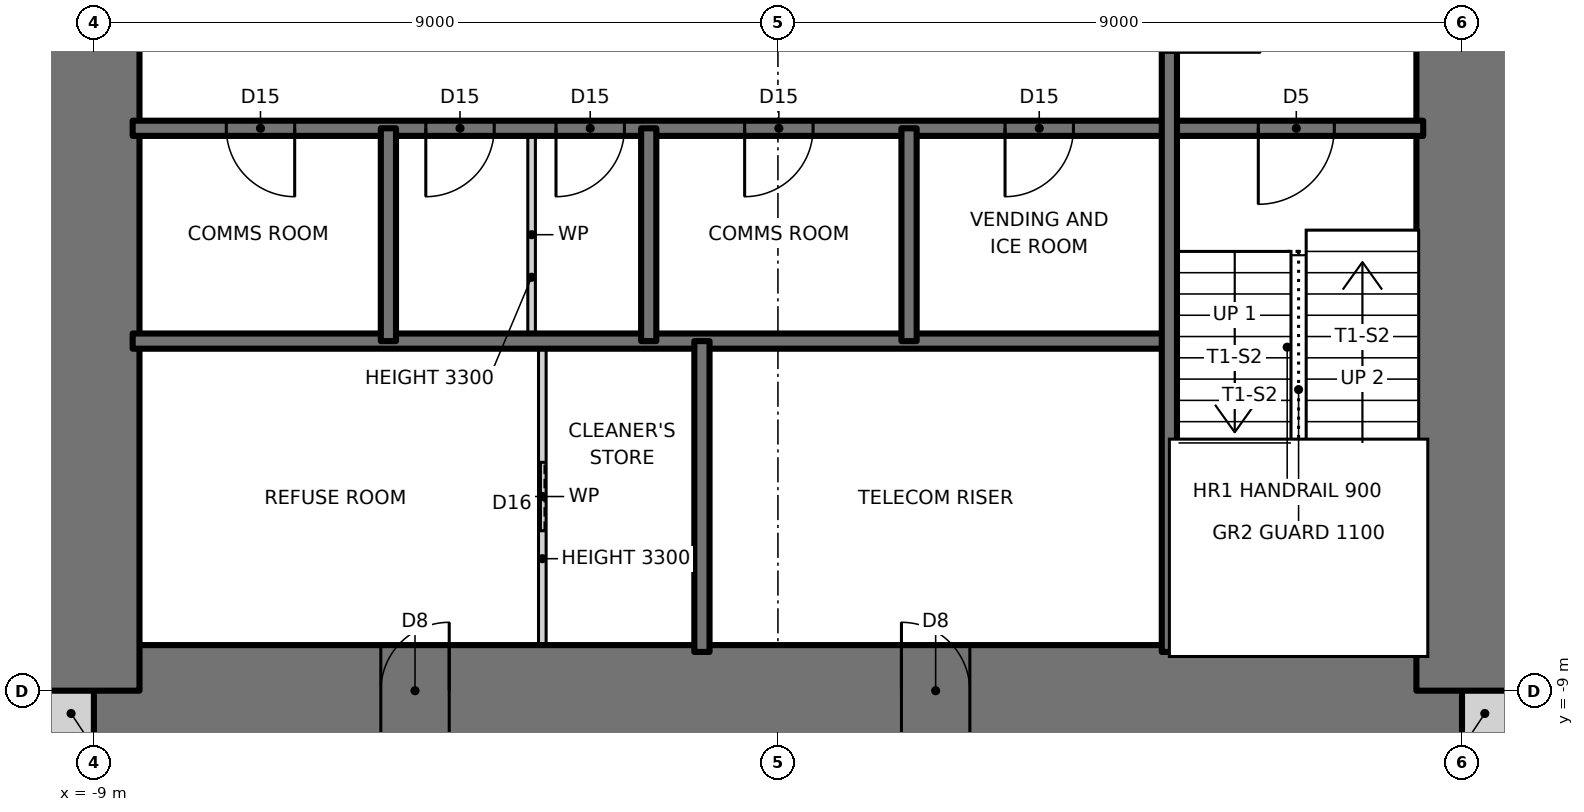
"""IFC4 building model, lengths in metres.
Left out: names, types, materials, properties, quantities, classifications, styles, units other than length and angle.
Written with IfcOpenShell. Run it as: python <this file> out.ifc"""

import sys

from ifc_helpers import new_model, si_unit, direction, frame, frame_2d, origin, place, context, subcontext, project, spatial, rectangle, extrude, element, fill, save


model = new_model("IFC4")
c1 = context("Model", 3, precision=1e-05, world=origin(), true_north=direction((0.0, 1.0)))
c2 = subcontext(c1, "Body", "Model", "MODEL_VIEW")
j1 = project(units=[si_unit("LENGTHUNIT", "METRE"), si_unit("PLANEANGLEUNIT", "RADIAN")], contexts=[c1])
p1 = place(None, origin())
s1 = spatial("IfcSite", under=j1, at=p1, CompositionType="ELEMENT")
p2 = place(p1, origin())
s2 = spatial("IfcBuilding", under=s1, at=p2, CompositionType="ELEMENT")
p3 = place(p2, frame((0.0, 0.0, 163.5)))
s3 = spatial("IfcBuildingStorey", under=s2, at=p3, CompositionType="ELEMENT", Elevation=163.5)
for number, where, z_axis, x_axis in (
    (1, (-9.6, -9.3, 0.0), (0.0, 0.0, 1.0), (1.0, 0.0, 0.0)),
    (2, (9.0, -9.3, 0.0), (0.0, 0.0, 1.0), (1.0, 0.0, 0.0)),
):
    element("IfcWall", number, at=place(p3, frame(where, z_axis=z_axis, x_axis=x_axis)), inside=s3, PredefinedType="SOLIDWALL", context=c2, shape_type="SweptSolid", body=[
        extrude(rectangle(XDim=0.6, YDim=0.6, at=frame_2d((0.3, 0.0))), origin(), (0.0, 0.0, 1.0), 3.5),
    ])
p4 = place(p3, frame((-9.0, -9.0, 0.0), z_axis=(0.0, 0.0, 1.0), x_axis=(1.0, 0.0, 0.0)))
e3 = element("IfcWall", 3, at=p4, inside=s3, PredefinedType="SHEAR", context=c2, shape_type="SweptSolid", body=[
    extrude(rectangle(XDim=18.0, YDim=1.2, at=frame_2d((9.0, 0.0))), origin(), (0.0, 0.0, 1.0), 3.5),
])
p5 = place(p4, frame((3.775, 0.0, 0.0)))
e4 = element("IfcOpeningElement", 4, at=p5, cuts=e3, PredefinedType="OPENING", context=c2, shape_type="SweptSolid", body=[
    extrude(rectangle(XDim=0.9, YDim=2.1, at=frame_2d((0.45, 1.05))), frame((0.0, 0.61, 0.0), z_axis=(0.0, -1.0, 0.0), x_axis=(1.0, 0.0, 0.0)), (0.0, 0.0, 1.0), 1.22),
])
p6 = place(p4, frame((10.625, 0.0, 0.0)))
e5 = element("IfcOpeningElement", 5, at=p6, cuts=e3, PredefinedType="OPENING", context=c2, shape_type="SweptSolid", body=[
    extrude(rectangle(XDim=0.9, YDim=2.1, at=frame_2d((0.45, 1.05))), frame((0.0, 0.61, 0.0), z_axis=(0.0, -1.0, 0.0), x_axis=(1.0, 0.0, 0.0)), (0.0, 0.0, 1.0), 1.22),
])
p7 = place(p3, frame((9.0, -9.0, 0.0), z_axis=(0.0, 0.0, 1.0), x_axis=(0.0, 1.0, 0.0)))
e6 = element("IfcWall", 6, at=p7, inside=s3, PredefinedType="SHEAR", context=c2, shape_type="SweptSolid", body=[
    extrude(rectangle(XDim=18.0, YDim=1.2, at=frame_2d((9.0, 0.0))), origin(), (0.0, 0.0, 1.0), 3.5),
])
p8 = place(p7, frame((8.5, 0.0, 0.0)))
e7 = element("IfcOpeningElement", 7, at=p8, cuts=e6, PredefinedType="OPENING", context=c2, shape_type="SweptSolid", body=[
    extrude(rectangle(XDim=1.0, YDim=2.1, at=frame_2d((0.5, 1.05))), frame((0.0, 0.61, 0.0), z_axis=(0.0, -1.0, 0.0), x_axis=(1.0, 0.0, 0.0)), (0.0, 0.0, 1.0), 1.22),
])
p9 = place(p3, frame((-9.0, 9.0, 0.0), z_axis=(0.0, 0.0, 1.0), x_axis=(0.0, -1.0, 0.0)))
e8 = element("IfcWall", 8, at=p9, inside=s3, PredefinedType="SHEAR", context=c2, shape_type="SweptSolid", body=[
    extrude(rectangle(XDim=18.0, YDim=1.2, at=frame_2d((9.0, 0.0))), origin(), (0.0, 0.0, 1.0), 3.5),
])
p10 = place(p9, frame((8.5, 0.0, 0.0)))
e9 = element("IfcOpeningElement", 9, at=p10, cuts=e8, PredefinedType="OPENING", context=c2, shape_type="SweptSolid", body=[
    extrude(rectangle(XDim=1.0, YDim=2.1, at=frame_2d((0.5, 1.05))), frame((0.0, 0.61, 0.0), z_axis=(0.0, -1.0, 0.0), x_axis=(1.0, 0.0, 0.0)), (0.0, 0.0, 1.0), 1.22),
])
p11 = place(p3, frame((-8.49, -4.4, 0.0), z_axis=(0.0, 0.0, 1.0), x_axis=(1.0, 0.0, 0.0)))
e10 = element("IfcWall", 10, at=p11, inside=s3, PredefinedType="SOLIDWALL", context=c2, shape_type="SweptSolid", body=[
    extrude(rectangle(XDim=13.64, YDim=0.2, at=frame_2d((6.82, 0.0))), origin(), (0.0, 0.0, 1.0), 3.5),
])
p12 = place(p3, frame((-8.49, -1.6, 0.0), z_axis=(0.0, 0.0, 1.0), x_axis=(1.0, 0.0, 0.0)))
e11 = element("IfcWall", 11, at=p12, inside=s3, PredefinedType="SOLIDWALL", context=c2, shape_type="SweptSolid", body=[
    extrude(rectangle(XDim=16.98, YDim=0.2, at=frame_2d((8.49, 0.0))), origin(), (0.0, 0.0, 1.0), 3.5),
])
p13 = place(p12, frame((14.81, 0.0, 0.0)))
e12 = element("IfcOpeningElement", 12, at=p13, cuts=e11, PredefinedType="OPENING", context=c2, shape_type="SweptSolid", body=[
    extrude(rectangle(XDim=1.0, YDim=2.1, at=frame_2d((0.5, 1.05))), frame((0.0, 0.11, 0.0), z_axis=(0.0, -1.0, 0.0), x_axis=(1.0, 0.0, 0.0)), (0.0, 0.0, 1.0), 0.22),
])
p14 = place(p12, frame((1.232, 0.0, 0.0)))
e13 = element("IfcOpeningElement", 13, at=p14, cuts=e11, PredefinedType="OPENING", context=c2, shape_type="SweptSolid", body=[
    extrude(rectangle(XDim=0.9, YDim=2.1, at=frame_2d((0.45, 1.05))), frame((0.0, 0.11, 0.0), z_axis=(0.0, -1.0, 0.0), x_axis=(1.0, 0.0, 0.0)), (0.0, 0.0, 1.0), 0.22),
])
p15 = place(p12, frame((5.57, 0.0, 0.0)))
e14 = element("IfcOpeningElement", 14, at=p15, cuts=e11, PredefinedType="OPENING", context=c2, shape_type="SweptSolid", body=[
    extrude(rectangle(XDim=0.9, YDim=2.1, at=frame_2d((0.45, 1.05))), frame((0.0, 0.11, 0.0), z_axis=(0.0, -1.0, 0.0), x_axis=(1.0, 0.0, 0.0)), (0.0, 0.0, 1.0), 0.22),
])
p16 = place(p12, frame((3.857, 0.0, 0.0)))
e15 = element("IfcOpeningElement", 15, at=p16, cuts=e11, PredefinedType="OPENING", context=c2, shape_type="SweptSolid", body=[
    extrude(rectangle(XDim=0.9, YDim=2.1, at=frame_2d((0.45, 1.05))), frame((0.0, 0.11, 0.0), z_axis=(0.0, -1.0, 0.0), x_axis=(1.0, 0.0, 0.0)), (0.0, 0.0, 1.0), 0.22),
])
p17 = place(p12, frame((8.052, 0.0, 0.0)))
e16 = element("IfcOpeningElement", 16, at=p17, cuts=e11, PredefinedType="OPENING", context=c2, shape_type="SweptSolid", body=[
    extrude(rectangle(XDim=0.9, YDim=2.1, at=frame_2d((0.45, 1.05))), frame((0.0, 0.11, 0.0), z_axis=(0.0, -1.0, 0.0), x_axis=(1.0, 0.0, 0.0)), (0.0, 0.0, 1.0), 0.22),
])
p18 = place(p12, frame((11.478, 0.0, 0.0)))
e17 = element("IfcOpeningElement", 17, at=p18, cuts=e11, PredefinedType="OPENING", context=c2, shape_type="SweptSolid", body=[
    extrude(rectangle(XDim=0.9, YDim=2.1, at=frame_2d((0.45, 1.05))), frame((0.0, 0.11, 0.0), z_axis=(0.0, -1.0, 0.0), x_axis=(1.0, 0.0, 0.0)), (0.0, 0.0, 1.0), 0.22),
])
p19 = place(p3, frame((5.15, -8.49, 0.0), z_axis=(0.0, 0.0, 1.0), x_axis=(0.0, 1.0, 0.0)))
e18 = element("IfcWall", 18, at=p19, inside=s3, PredefinedType="SOLIDWALL", context=c2, shape_type="SweptSolid", body=[
    extrude(rectangle(XDim=13.09, YDim=0.2, at=frame_2d((6.545, 0.0))), origin(), (0.0, 0.0, 1.0), 3.5),
])
p20 = place(p19, frame((7.89, 0.0, 0.0)))
e19 = element("IfcOpeningElement", 19, at=p20, cuts=e18, PredefinedType="OPENING", context=c2, shape_type="SweptSolid", body=[
    extrude(rectangle(XDim=1.2, YDim=2.1, at=frame_2d((0.6, 1.05))), frame((0.0, 0.11, 0.0), z_axis=(0.0, -1.0, 0.0), x_axis=(1.0, 0.0, 0.0)), (0.0, 0.0, 1.0), 0.22),
])
p21 = place(p3, frame((1.725, -4.4, 0.0), z_axis=(0.0, 0.0, 1.0), x_axis=(0.0, 1.0, 0.0)))
e20 = element("IfcWall", 20, at=p21, inside=s3, PredefinedType="SOLIDWALL", context=c2, shape_type="SweptSolid", body=[
    extrude(rectangle(XDim=2.8, YDim=0.2, at=frame_2d((1.4, 0.0))), origin(), (0.0, 0.0, 1.0), 3.5),
])
p22 = place(p3, frame((-1.0, -8.49, 0.0), z_axis=(0.0, 0.0, 1.0), x_axis=(0.0, 1.0, 0.0)))
e21 = element("IfcWall", 21, at=p22, inside=s3, PredefinedType="SOLIDWALL", context=c2, shape_type="SweptSolid", body=[
    extrude(rectangle(XDim=4.09, YDim=0.2, at=frame_2d((2.045, 0.0))), origin(), (0.0, 0.0, 1.0), 3.5),
])
p23 = place(p3, frame((-1.7, -4.4, 0.0), z_axis=(0.0, 0.0, 1.0), x_axis=(0.0, 1.0, 0.0)))
e22 = element("IfcWall", 22, at=p23, inside=s3, PredefinedType="SOLIDWALL", context=c2, shape_type="SweptSolid", body=[
    extrude(rectangle(XDim=2.8, YDim=0.2, at=frame_2d((1.4, 0.0))), origin(), (0.0, 0.0, 1.0), 3.5),
])
p24 = place(p3, frame((-3.1, -8.49, 0.0), z_axis=(0.0, 0.0, 1.0), x_axis=(0.0, 1.0, 0.0)))
e23 = element("IfcWall", 23, at=p24, inside=s3, PredefinedType="PARTITIONING", context=c2, shape_type="SweptSolid", body=[
    extrude(rectangle(XDim=4.09, YDim=0.1, at=frame_2d((2.045, 0.0))), origin(), (0.0, 0.0, 1.0), 3.3),
])
p25 = place(p24, frame((1.595, 0.0, 0.0)))
e24 = element("IfcOpeningElement", 24, at=p25, cuts=e23, PredefinedType="OPENING", context=c2, shape_type="SweptSolid", body=[
    extrude(rectangle(XDim=0.9, YDim=2.1, at=frame_2d((0.45, 1.05))), frame((0.0, 0.06, 0.0), z_axis=(0.0, -1.0, 0.0), x_axis=(1.0, 0.0, 0.0)), (0.0, 0.0, 1.0), 0.12),
])
p26 = place(p3, frame((-3.241, -4.4, 0.0), z_axis=(0.0, 0.0, 1.0), x_axis=(0.0, 1.0, 0.0)))
e25 = element("IfcWall", 25, at=p26, inside=s3, PredefinedType="PARTITIONING", context=c2, shape_type="SweptSolid", body=[
    extrude(rectangle(XDim=2.8, YDim=0.1, at=frame_2d((1.4, 0.0))), origin(), (0.0, 0.0, 1.0), 3.3),
])
p27 = place(p3, frame((-5.125, -4.4, 0.0), z_axis=(0.0, 0.0, 1.0), x_axis=(0.0, 1.0, 0.0)))
e26 = element("IfcWall", 26, at=p27, inside=s3, PredefinedType="SOLIDWALL", context=c2, shape_type="SweptSolid", body=[
    extrude(rectangle(XDim=2.8, YDim=0.2, at=frame_2d((1.4, 0.0))), origin(), (0.0, 0.0, 1.0), 3.5),
])
p28 = place(p13, frame((1.0, 0.0, 0.0), z_axis=(0.0, 0.0, 1.0), x_axis=(-1.0, 0.0, 0.0)))
e27 = element("IfcDoor", 27, at=p28, inside=s3, OperationType="SINGLE_SWING_RIGHT", PredefinedType="DOOR", context=c2, shape_type="SweptSolid", body=[
    extrude(rectangle(XDim=1.0, YDim=2.1, at=frame_2d((0.5, 1.05))), frame((0.0, 0.025, 0.0), z_axis=(0.0, -1.0, 0.0), x_axis=(1.0, 0.0, 0.0)), (0.0, 0.0, 1.0), 0.05),
])
fill(e12, e27)
p29 = place(p20, frame((1.2, 0.0, 0.0), z_axis=(0.0, 0.0, 1.0), x_axis=(-1.0, 0.0, 0.0)))
e28 = element("IfcDoor", 28, at=p29, inside=s3, OperationType="SINGLE_SWING_RIGHT", PredefinedType="DOOR", context=c2, shape_type="SweptSolid", body=[
    extrude(rectangle(XDim=1.2, YDim=2.1, at=frame_2d((0.6, 1.05))), frame((0.0, 0.025, 0.0), z_axis=(0.0, -1.0, 0.0), x_axis=(1.0, 0.0, 0.0)), (0.0, 0.0, 1.0), 0.05),
])
fill(e19, e28)
p30 = place(p14, frame((0.9, 0.0, 0.0), z_axis=(0.0, 0.0, 1.0), x_axis=(-1.0, 0.0, 0.0)))
e29 = element("IfcDoor", 29, at=p30, inside=s3, OperationType="SINGLE_SWING_LEFT", PredefinedType="DOOR", context=c2, shape_type="SweptSolid", body=[
    extrude(rectangle(XDim=0.9, YDim=2.1, at=frame_2d((0.45, 1.05))), frame((0.0, 0.025, 0.0), z_axis=(0.0, -1.0, 0.0), x_axis=(1.0, 0.0, 0.0)), (0.0, 0.0, 1.0), 0.05),
])
fill(e13, e29)
p31 = place(p15, frame((0.9, 0.0, 0.0), z_axis=(0.0, 0.0, 1.0), x_axis=(-1.0, 0.0, 0.0)))
e30 = element("IfcDoor", 30, at=p31, inside=s3, OperationType="SINGLE_SWING_RIGHT", PredefinedType="DOOR", context=c2, shape_type="SweptSolid", body=[
    extrude(rectangle(XDim=0.9, YDim=2.1, at=frame_2d((0.45, 1.05))), frame((0.0, 0.025, 0.0), z_axis=(0.0, -1.0, 0.0), x_axis=(1.0, 0.0, 0.0)), (0.0, 0.0, 1.0), 0.05),
])
fill(e14, e30)
p32 = place(p16, frame((0.9, 0.0, 0.0), z_axis=(0.0, 0.0, 1.0), x_axis=(-1.0, 0.0, 0.0)))
e31 = element("IfcDoor", 31, at=p32, inside=s3, OperationType="SINGLE_SWING_RIGHT", PredefinedType="DOOR", context=c2, shape_type="SweptSolid", body=[
    extrude(rectangle(XDim=0.9, YDim=2.1, at=frame_2d((0.45, 1.05))), frame((0.0, 0.025, 0.0), z_axis=(0.0, -1.0, 0.0), x_axis=(1.0, 0.0, 0.0)), (0.0, 0.0, 1.0), 0.05),
])
fill(e15, e31)
p33 = place(p17, frame((0.9, 0.0, 0.0), z_axis=(0.0, 0.0, 1.0), x_axis=(-1.0, 0.0, 0.0)))
e32 = element("IfcDoor", 32, at=p33, inside=s3, OperationType="SINGLE_SWING_RIGHT", PredefinedType="DOOR", context=c2, shape_type="SweptSolid", body=[
    extrude(rectangle(XDim=0.9, YDim=2.1, at=frame_2d((0.45, 1.05))), frame((0.0, 0.025, 0.0), z_axis=(0.0, -1.0, 0.0), x_axis=(1.0, 0.0, 0.0)), (0.0, 0.0, 1.0), 0.05),
])
fill(e16, e32)
p34 = place(p18, frame((0.9, 0.0, 0.0), z_axis=(0.0, 0.0, 1.0), x_axis=(-1.0, 0.0, 0.0)))
e33 = element("IfcDoor", 33, at=p34, inside=s3, OperationType="SINGLE_SWING_RIGHT", PredefinedType="DOOR", context=c2, shape_type="SweptSolid", body=[
    extrude(rectangle(XDim=0.9, YDim=2.1, at=frame_2d((0.45, 1.05))), frame((0.0, 0.025, 0.0), z_axis=(0.0, -1.0, 0.0), x_axis=(1.0, 0.0, 0.0)), (0.0, 0.0, 1.0), 0.05),
])
fill(e17, e33)
p35 = place(p25, origin())
e34 = element("IfcDoor", 34, at=p35, inside=s3, OperationType="SLIDING_TO_LEFT", PredefinedType="DOOR", context=c2, shape_type="SweptSolid", body=[
    extrude(rectangle(XDim=0.9, YDim=2.1, at=frame_2d((0.45, 1.05))), frame((0.0, 0.025, 0.0), z_axis=(0.0, -1.0, 0.0), x_axis=(1.0, 0.0, 0.0)), (0.0, 0.0, 1.0), 0.05),
])
fill(e24, e34)
p36 = place(p5, origin())
e35 = element("IfcDoor", 35, at=p36, inside=s3, OperationType="SINGLE_SWING_RIGHT", PredefinedType="DOOR", context=c2, shape_type="SweptSolid", body=[
    extrude(rectangle(XDim=0.9, YDim=2.1, at=frame_2d((0.45, 1.05))), frame((0.0, 0.025, 0.0), z_axis=(0.0, -1.0, 0.0), x_axis=(1.0, 0.0, 0.0)), (0.0, 0.0, 1.0), 0.05),
])
fill(e4, e35)
p37 = place(p6, origin())
e36 = element("IfcDoor", 36, at=p37, inside=s3, OperationType="SINGLE_SWING_LEFT", PredefinedType="DOOR", context=c2, shape_type="SweptSolid", body=[
    extrude(rectangle(XDim=0.9, YDim=2.1, at=frame_2d((0.45, 1.05))), frame((0.0, 0.025, 0.0), z_axis=(0.0, -1.0, 0.0), x_axis=(1.0, 0.0, 0.0)), (0.0, 0.0, 1.0), 0.05),
])
fill(e5, e36)
save(model, sys.argv[1])
